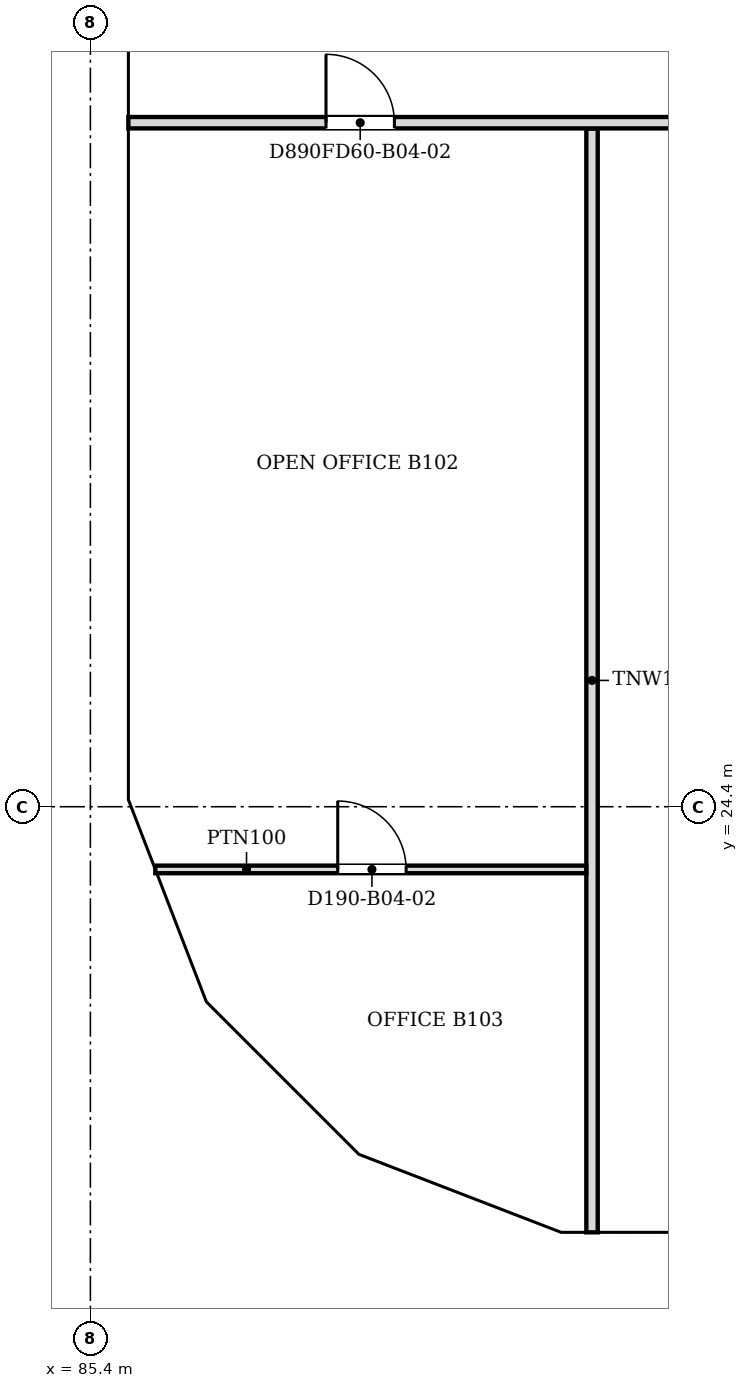
"""IFC4 building model, lengths in metres.
Left out: names, types, materials, properties, quantities, classifications, styles, units other than length and angle.
Written with IfcOpenShell. Run it as: python <this file> out.ifc"""

import sys

from ifc_helpers import new_model, si_unit, direction, frame, frame_2d, origin, place, context, subcontext, project, spatial, polyline, rectangle, outline, extrude, faceted_brep, source, transform, mapped, element, fill, save


model = new_model("IFC4")
c1 = context("Model", 3, precision=1e-05, world=origin(), true_north=direction((0.0, 1.0)))
c2 = subcontext(c1, "Body", "Model", "MODEL_VIEW")
j1 = project(units=[si_unit("LENGTHUNIT", "METRE"), si_unit("PLANEANGLEUNIT", "RADIAN")], contexts=[c1])
p1 = place(None, origin())
s1 = spatial("IfcSite", under=j1, at=p1, CompositionType="ELEMENT")
p2 = place(p1, origin())
s2 = spatial("IfcBuilding", under=s1, at=p2, CompositionType="ELEMENT")
p3 = place(p2, frame((0.0, 0.0, 41.0)))
s3 = spatial("IfcBuildingStorey", under=s2, at=p3, CompositionType="ELEMENT", Elevation=41.0)
m1 = source(origin(), c2, "Body", "Brep", [
    faceted_brep([(0.047, -0.25, 0.0), (3.05, -0.25, 3.8), (0.047, -0.25, 7.6), (0.0, -0.25, 7.54), (0.0, -0.25, 0.06), (0.093, 0.25, 7.541), (3.05, 0.25, 3.8), (0.093, 0.25, 0.059), (0.047, 0.0, 0.0), (0.047, 0.0, 7.6)], [[[0, 1, 2, 3, 4]], [[5, 6, 7]], [[7, 6, 1, 0, 8]], [[6, 5, 9, 2, 1]], [[3, 2, 9]], [[8, 0, 4]], [[7, 8, 4, 3, 9, 5]]]),
])
p4 = place(p3, frame((91.5, 18.55, -3.8), z_axis=(0.0, 0.0, 1.0), x_axis=(1.0, 0.0, 0.0)))
e1 = element("IfcWall", 1, at=p4, inside=s3, PredefinedType="SOLIDWALL", context=c2, shape_type="MappedRepresentation", body=[
    mapped(m1, transform((0.0, 0.0, 0.0), scale=1.0)),
])
m2 = source(origin(), c2, "Body", "SweptSolid", [
    extrude(outline(polyline([(0.247, 0.656), (2.731, 3.8), (0.247, 6.944), (0.247, 0.656)])), frame((0.0, 0.26, 0.0), z_axis=(0.0, -1.0, 0.0), x_axis=(1.0, 0.0, 0.0)), (0.0, 0.0, 1.0), 0.52),
])
p5 = place(p4, origin())
e2 = element("IfcOpeningElement", 2, at=p5, cuts=e1, PredefinedType="OPENING", context=c2, shape_type="MappedRepresentation", body=[
    mapped(m2, transform((0.0, 0.0, 0.0), scale=1.0)),
])
m3 = source(origin(), c2, "Body", "Brep", [
    faceted_brep([(2.95, -0.25, 0.0), (2.997, -0.25, 0.059), (2.997, -0.25, 7.541), (2.95, -0.25, 7.6), (0.0, -0.25, 3.8), (0.053, 0.25, 3.868), (2.904, 0.25, 7.54), (2.904, 0.25, 0.06), (0.053, 0.25, 3.732), (2.95, 0.0, 0.0), (2.95, 0.0, 7.6), (0.0, 0.0, 3.8)], [[[0, 1, 2, 3, 4]], [[5, 6, 7, 8]], [[1, 0, 9]], [[10, 3, 2]], [[6, 5, 11, 4, 3, 10]], [[8, 7, 9, 0, 4, 11]], [[8, 11, 5]], [[1, 9, 7, 6, 10, 2]]]),
])
p6 = place(p3, frame((88.794, 19.612, -3.8), z_axis=(0.0, 0.0, 1.0), x_axis=(0.933000876937, -0.359874094142, 0.0)))
e3 = element("IfcWall", 3, at=p6, inside=s3, PredefinedType="SOLIDWALL", context=c2, shape_type="MappedRepresentation", body=[
    mapped(m3, transform((0.0, 0.0, 0.0), scale=1.0)),
])
m4 = source(origin(), c2, "Body", "SweptSolid", [
    extrude(outline(polyline([(2.75, 6.935), (0.316, 3.8), (2.75, 0.665), (2.75, 6.935)])), frame((0.0, 0.26, 0.0), z_axis=(0.0, -1.0, 0.0), x_axis=(1.0, 0.0, 0.0)), (0.0, 0.0, 1.0), 0.52),
])
p7 = place(p6, origin())
e4 = element("IfcOpeningElement", 4, at=p7, cuts=e3, PredefinedType="OPENING", context=c2, shape_type="MappedRepresentation", body=[
    mapped(m4, transform((0.0, 0.0, 0.0), scale=1.0)),
])
m5 = source(origin(), c2, "Body", "SweptSolid", [
    extrude(outline(polyline([(3.05, 0.0), (6.1, 3.8), (3.05, 7.6), (0.0, 3.8), (3.05, 0.0)])), frame((0.0, 0.25, 0.0), z_axis=(0.0, -1.0, 0.0), x_axis=(1.0, 0.0, 0.0)), (0.0, 0.0, 1.0), 0.5),
])
p8 = place(p3, frame((85.65, 36.6, -3.8), z_axis=(0.0, 0.0, 1.0), x_axis=(0.0, -1.0, 0.0)))
e5 = element("IfcWall", 5, at=p8, inside=s3, PredefinedType="SOLIDWALL", context=c2, shape_type="MappedRepresentation", body=[
    mapped(m5, transform((0.0, 0.0, 0.0), scale=1.0)),
])
m6 = source(origin(), c2, "Body", "SweptSolid", [
    extrude(outline(polyline([(3.05, 0.399), (5.78, 3.8), (3.05, 7.201), (0.321, 3.8), (3.05, 0.399)])), frame((0.0, 0.26, 0.0), z_axis=(0.0, -1.0, 0.0), x_axis=(1.0, 0.0, 0.0)), (0.0, 0.0, 1.0), 0.52),
])
p9 = place(p8, origin())
e6 = element("IfcOpeningElement", 6, at=p9, cuts=e5, PredefinedType="OPENING", context=c2, shape_type="MappedRepresentation", body=[
    mapped(m6, transform((0.0, 0.0, 0.0), scale=1.0)),
])
m7 = source(origin(), c2, "Body", "Brep", [
    faceted_brep([(3.05, -0.25, 0.0), (6.053, -0.25, 3.8), (3.05, -0.25, 7.6), (0.0, -0.25, 3.8), (0.0, 0.25, 3.8), (3.05, 0.25, 7.6), (6.007, 0.25, 3.859), (6.007, 0.25, 3.741), (3.05, 0.25, 0.0), (6.053, 0.0, 3.8)], [[[0, 1, 2, 3]], [[4, 5, 6, 7, 8]], [[8, 7, 9, 1, 0]], [[6, 5, 2, 1, 9]], [[5, 4, 3, 2]], [[4, 8, 0, 3]], [[9, 7, 6]]]),
])
p10 = place(p3, frame((85.65, 30.5, -3.8), z_axis=(0.0, 0.0, 1.0), x_axis=(0.0, -1.0, 0.0)))
e7 = element("IfcWall", 7, at=p10, inside=s3, PredefinedType="SOLIDWALL", context=c2, shape_type="MappedRepresentation", body=[
    mapped(m7, transform((0.0, 0.0, 0.0), scale=1.0)),
])
m8 = source(origin(), c2, "Body", "SweptSolid", [
    extrude(outline(polyline([(3.049, 0.401), (5.735, 3.8), (3.049, 7.199), (0.321, 3.8), (3.049, 0.401)])), frame((0.0, 0.26, 0.0), z_axis=(0.0, -1.0, 0.0), x_axis=(1.0, 0.0, 0.0)), (0.0, 0.0, 1.0), 0.52),
])
p11 = place(p10, origin())
e8 = element("IfcOpeningElement", 8, at=p11, cuts=e7, PredefinedType="OPENING", context=c2, shape_type="MappedRepresentation", body=[
    mapped(m8, transform((0.0, 0.0, 0.0), scale=1.0)),
])
m9 = source(origin(), c2, "Body", "Brep", [
    faceted_brep([(2.95, -0.25, 0.0), (3.003, -0.25, 0.068), (3.003, -0.25, 7.532), (2.95, -0.25, 7.6), (0.0, -0.25, 3.8), (0.047, 0.25, 3.86), (2.898, 0.25, 7.532), (2.898, 0.25, 0.068), (0.047, 0.25, 3.74), (2.95, 0.0, 0.0), (2.95, 0.0, 7.6), (0.0, 0.0, 3.8)], [[[0, 1, 2, 3, 4]], [[5, 6, 7, 8]], [[1, 0, 9]], [[10, 3, 2]], [[6, 5, 11, 4, 3, 10]], [[8, 7, 9, 0, 4, 11]], [[8, 11, 5]], [[1, 9, 7, 6, 10, 2]]]),
])
p12 = place(p3, frame((85.65, 24.447, -3.8), z_axis=(0.0, 0.0, 1.0), x_axis=(0.35992665181, -0.932980602862, 0.0)))
e9 = element("IfcWall", 9, at=p12, inside=s3, PredefinedType="SOLIDWALL", context=c2, shape_type="MappedRepresentation", body=[
    mapped(m9, transform((0.0, 0.0, 0.0), scale=1.0)),
])
p13 = place(p12, origin())
e10 = element("IfcOpeningElement", 10, at=p13, cuts=e9, PredefinedType="OPENING", context=c2, shape_type="MappedRepresentation", body=[
    mapped(m4, transform((0.0, 0.0, 0.0), scale=1.0)),
])
m10 = source(origin(), c2, "Body", "Brep", [
    faceted_brep([(0.053, -0.25, 0.0), (2.997, -0.25, 3.8), (0.053, -0.25, 7.6), (0.0, -0.25, 7.532), (0.0, -0.25, 0.068), (0.106, 0.25, 7.532), (2.944, 0.25, 3.868), (2.944, 0.25, 3.732), (0.106, 0.25, 0.068), (2.997, 0.0, 3.8), (0.053, 0.0, 0.0), (0.053, 0.0, 7.6)], [[[0, 1, 2, 3, 4]], [[5, 6, 7, 8]], [[8, 7, 9, 1, 0, 10]], [[6, 5, 11, 2, 1, 9]], [[3, 2, 11]], [[10, 0, 4]], [[8, 10, 4, 3, 11, 5]], [[9, 7, 6]]]),
])
p14 = place(p3, frame((86.675, 21.731, -3.8), z_axis=(0.0, 0.0, 1.0), x_axis=(0.707106781187, -0.707106781187, 0.0)))
e11 = element("IfcWall", 11, at=p14, inside=s3, PredefinedType="SOLIDWALL", context=c2, shape_type="MappedRepresentation", body=[
    mapped(m10, transform((0.0, 0.0, 0.0), scale=1.0)),
])
m11 = source(origin(), c2, "Body", "SweptSolid", [
    extrude(outline(polyline([(0.253, 0.666), (2.681, 3.8), (0.253, 6.934), (0.253, 0.666)])), frame((0.0, 0.26, 0.0), z_axis=(0.0, -1.0, 0.0), x_axis=(1.0, 0.0, 0.0)), (0.0, 0.0, 1.0), 0.52),
])
p15 = place(p14, origin())
e12 = element("IfcOpeningElement", 12, at=p15, cuts=e11, PredefinedType="OPENING", context=c2, shape_type="MappedRepresentation", body=[
    mapped(m11, transform((0.0, 0.0, 0.0), scale=1.0)),
])
p16 = place(p2, frame((0.0, 0.0, 44.8)))
s4 = spatial("IfcBuildingStorey", under=s2, at=p16, CompositionType="ELEMENT", Elevation=44.8)
m12 = source(origin(), c2, "Body", "Brep", [
    faceted_brep([(3.003, -0.25, 0.0), (6.053, -0.25, 3.8), (3.003, -0.25, 7.6), (0.0, -0.25, 3.8), (0.047, 0.25, 3.859), (3.003, 0.25, 7.6), (6.053, 0.25, 3.8), (3.003, 0.25, 0.0), (0.047, 0.25, 3.741), (0.0, 0.0, 3.8)], [[[0, 1, 2, 3]], [[4, 5, 6, 7, 8]], [[7, 6, 1, 0]], [[6, 5, 2, 1]], [[5, 4, 9, 3, 2]], [[8, 7, 0, 3, 9]], [[8, 9, 4]]]),
])
p17 = place(p16, frame((91.547, 18.55, -3.8), z_axis=(0.0, 0.0, 1.0), x_axis=(1.0, 0.0, 0.0)))
e13 = element("IfcWall", 13, at=p17, inside=s4, PredefinedType="SOLIDWALL", context=c2, shape_type="MappedRepresentation", body=[
    mapped(m12, transform((0.0, 0.0, 0.0), scale=1.0)),
])
m13 = source(origin(), c2, "Body", "SweptSolid", [
    extrude(outline(polyline([(3.005, 0.401), (5.733, 3.8), (3.005, 7.199), (0.319, 3.8), (3.005, 0.401)])), frame((0.0, 0.26, 0.0), z_axis=(0.0, -1.0, 0.0), x_axis=(1.0, 0.0, 0.0)), (0.0, 0.0, 1.0), 0.52),
])
p18 = place(p17, origin())
e14 = element("IfcOpeningElement", 14, at=p18, cuts=e13, PredefinedType="OPENING", context=c2, shape_type="MappedRepresentation", body=[
    mapped(m13, transform((0.0, 0.0, 0.0), scale=1.0)),
])
m14 = source(origin(), c2, "Body", "Brep", [
    faceted_brep([(3.05, -0.25, 0.0), (6.1, -0.25, 3.8), (6.1, -0.25, 3.8), (3.05, -0.25, 7.6), (0.0, -0.25, 3.8), (0.0, 0.25, 3.8), (3.05, 0.25, 7.6), (6.1, 0.25, 3.8), (6.1, 0.25, 3.8), (3.05, 0.25, 0.0)], [[[0, 1, 2, 3, 4]], [[5, 6, 7, 8, 9]], [[9, 8, 1, 0]], [[7, 6, 3, 2]], [[6, 5, 4, 3]], [[5, 9, 0, 4]], [[1, 8, 7, 2]]]),
])
p19 = place(p16, frame((85.65, 39.65, -3.8), z_axis=(0.0, 0.0, 1.0), x_axis=(0.0, -1.0, 0.0)))
e15 = element("IfcWall", 15, at=p19, inside=s4, PredefinedType="SOLIDWALL", context=c2, shape_type="MappedRepresentation", body=[
    mapped(m14, transform((0.0, 0.0, 0.0), scale=1.0)),
])
p20 = place(p19, origin())
e16 = element("IfcOpeningElement", 16, at=p20, cuts=e15, PredefinedType="OPENING", context=c2, shape_type="MappedRepresentation", body=[
    mapped(m6, transform((0.0, 0.0, 0.0), scale=1.0)),
])
p21 = place(p16, frame((85.65, 33.55, -3.8), z_axis=(0.0, 0.0, 1.0), x_axis=(0.0, -1.0, 0.0)))
e17 = element("IfcWall", 17, at=p21, inside=s4, PredefinedType="SOLIDWALL", context=c2, shape_type="MappedRepresentation", body=[
    mapped(m5, transform((0.0, 0.0, 0.0), scale=1.0)),
])
p22 = place(p21, origin())
e18 = element("IfcOpeningElement", 18, at=p22, cuts=e17, PredefinedType="OPENING", context=c2, shape_type="MappedRepresentation", body=[
    mapped(m6, transform((0.0, 0.0, 0.0), scale=1.0)),
])
m15 = source(origin(), c2, "Body", "Brep", [
    faceted_brep([(3.003, -0.25, 0.0), (3.05, -0.25, 0.06), (3.05, -0.25, 7.54), (3.003, -0.25, 7.6), (0.0, -0.25, 3.8), (0.0, 0.25, 3.8), (2.957, 0.25, 7.541), (2.957, 0.25, 0.059), (3.003, 0.0, 0.0), (3.003, 0.0, 7.6)], [[[0, 1, 2, 3, 4]], [[5, 6, 7]], [[1, 0, 8]], [[9, 3, 2]], [[6, 5, 4, 3, 9]], [[5, 7, 8, 0, 4]], [[1, 8, 7, 6, 9, 2]]]),
])
p23 = place(p16, frame((85.65, 27.45, -3.8), z_axis=(0.0, 0.0, 1.0), x_axis=(0.0, -1.0, 0.0)))
e19 = element("IfcWall", 19, at=p23, inside=s4, PredefinedType="SOLIDWALL", context=c2, shape_type="MappedRepresentation", body=[
    mapped(m15, transform((0.0, 0.0, 0.0), scale=1.0)),
])
m16 = source(origin(), c2, "Body", "SweptSolid", [
    extrude(outline(polyline([(2.803, 6.944), (0.319, 3.8), (2.803, 0.656), (2.803, 6.944)])), frame((0.0, 0.26, 0.0), z_axis=(0.0, -1.0, 0.0), x_axis=(1.0, 0.0, 0.0)), (0.0, 0.0, 1.0), 0.52),
])
p24 = place(p23, origin())
e20 = element("IfcOpeningElement", 20, at=p24, cuts=e19, PredefinedType="OPENING", context=c2, shape_type="MappedRepresentation", body=[
    mapped(m16, transform((0.0, 0.0, 0.0), scale=1.0)),
])
m17 = source(origin(), c2, "Body", "Brep", [
    faceted_brep([(0.047, -0.25, 0.0), (2.997, -0.25, 3.8), (0.047, -0.25, 7.6), (0.0, -0.25, 7.541), (0.0, -0.25, 0.059), (0.093, 0.25, 7.54), (2.944, 0.25, 3.868), (2.944, 0.25, 3.732), (0.093, 0.25, 0.06), (2.997, 0.0, 3.8), (0.047, 0.0, 0.0), (0.047, 0.0, 7.6)], [[[0, 1, 2, 3, 4]], [[5, 6, 7, 8]], [[8, 7, 9, 1, 0, 10]], [[6, 5, 11, 2, 1, 9]], [[3, 2, 11]], [[10, 0, 4]], [[8, 10, 4, 3, 11, 5]], [[9, 7, 6]]]),
])
p25 = place(p16, frame((85.633, 24.49, -3.8), z_axis=(0.0, 0.0, 1.0), x_axis=(0.359901446078, -0.932990326376, 0.0)))
e21 = element("IfcWall", 21, at=p25, inside=s4, PredefinedType="SOLIDWALL", context=c2, shape_type="MappedRepresentation", body=[
    mapped(m17, transform((0.0, 0.0, 0.0), scale=1.0)),
])
m18 = source(origin(), c2, "Body", "SweptSolid", [
    extrude(outline(polyline([(0.247, 0.665), (2.681, 3.8), (0.247, 6.935), (0.247, 0.665)])), frame((0.0, 0.26, 0.0), z_axis=(0.0, -1.0, 0.0), x_axis=(1.0, 0.0, 0.0)), (0.0, 0.0, 1.0), 0.52),
])
p26 = place(p25, origin())
e22 = element("IfcOpeningElement", 22, at=p26, cuts=e21, PredefinedType="OPENING", context=c2, shape_type="MappedRepresentation", body=[
    mapped(m18, transform((0.0, 0.0, 0.0), scale=1.0)),
])
m19 = source(origin(), c2, "Body", "Brep", [
    faceted_brep([(2.944, -0.25, 0.0), (2.997, -0.25, 0.068), (2.997, -0.25, 7.532), (2.944, -0.25, 7.6), (0.0, -0.25, 3.8), (0.053, 0.25, 3.868), (2.891, 0.25, 7.532), (2.891, 0.25, 0.068), (0.053, 0.25, 3.732), (2.944, 0.0, 0.0), (2.944, 0.0, 7.6), (0.0, 0.0, 3.8)], [[[0, 1, 2, 3, 4]], [[5, 6, 7, 8]], [[1, 0, 9]], [[10, 3, 2]], [[6, 5, 11, 4, 3, 10]], [[8, 7, 9, 0, 4, 11]], [[8, 11, 5]], [[1, 9, 7, 6, 10, 2]]]),
])
p27 = place(p16, frame((86.712, 21.694, -3.8), z_axis=(0.0, 0.0, 1.0), x_axis=(0.707066050402, -0.707147509625, 0.0)))
e23 = element("IfcWall", 23, at=p27, inside=s4, PredefinedType="SOLIDWALL", context=c2, shape_type="MappedRepresentation", body=[
    mapped(m19, transform((0.0, 0.0, 0.0), scale=1.0)),
])
m20 = source(origin(), c2, "Body", "SweptSolid", [
    extrude(outline(polyline([(2.744, 6.934), (0.316, 3.8), (2.744, 0.666), (2.744, 6.934)])), frame((0.0, 0.26, 0.0), z_axis=(0.0, -1.0, 0.0), x_axis=(1.0, 0.0, 0.0)), (0.0, 0.0, 1.0), 0.52),
])
p28 = place(p27, origin())
e24 = element("IfcOpeningElement", 24, at=p28, cuts=e23, PredefinedType="OPENING", context=c2, shape_type="MappedRepresentation", body=[
    mapped(m20, transform((0.0, 0.0, 0.0), scale=1.0)),
])
m21 = source(origin(), c2, "Body", "Brep", [
    faceted_brep([(0.053, -0.25, 0.0), (3.003, -0.25, 3.8), (0.053, -0.25, 7.6), (0.0, -0.25, 7.532), (0.0, -0.25, 0.068), (0.106, 0.25, 7.532), (2.957, 0.25, 3.86), (2.957, 0.25, 3.74), (0.106, 0.25, 0.068), (3.003, 0.0, 3.8), (0.053, 0.0, 0.0), (0.053, 0.0, 7.6)], [[[0, 1, 2, 3, 4]], [[5, 6, 7, 8]], [[8, 7, 9, 1, 0, 10]], [[6, 5, 11, 2, 1, 9]], [[3, 2, 11]], [[10, 0, 4]], [[8, 10, 4, 3, 11, 5]], [[9, 7, 6]]]),
])
p29 = place(p16, frame((88.744, 19.631, -3.8), z_axis=(0.0, 0.0, 1.0), x_axis=(0.932997369089, -0.359883188373, 0.0)))
e25 = element("IfcWall", 25, at=p29, inside=s4, PredefinedType="SOLIDWALL", context=c2, shape_type="MappedRepresentation", body=[
    mapped(m21, transform((0.0, 0.0, 0.0), scale=1.0)),
])
m22 = source(origin(), c2, "Body", "SweptSolid", [
    extrude(outline(polyline([(0.253, 0.665), (2.687, 3.8), (0.253, 6.935), (0.253, 0.665)])), frame((0.0, 0.26, 0.0), z_axis=(0.0, -1.0, 0.0), x_axis=(1.0, 0.0, 0.0)), (0.0, 0.0, 1.0), 0.52),
])
p30 = place(p29, origin())
e26 = element("IfcOpeningElement", 26, at=p30, cuts=e25, PredefinedType="OPENING", context=c2, shape_type="MappedRepresentation", body=[
    mapped(m22, transform((0.0, 0.0, 0.0), scale=1.0)),
])
p31 = place(p3, frame((92.0, 18.8, 0.0), z_axis=(0.0, 0.0, 1.0), x_axis=(0.0, 1.0, 0.0)))
e27 = element("IfcWall", 27, at=p31, inside=s3, PredefinedType="PARTITIONING", context=c2, shape_type="SweptSolid", body=[
    extrude(rectangle(XDim=14.524, YDim=0.15, at=frame_2d((7.262, 0.0))), origin(), (0.0, 0.0, 1.0), 3.067),
])
p32 = place(p3, frame((91.924, 23.575, 0.0), z_axis=(0.0, 0.0, 1.0), x_axis=(-1.0, 0.0, 0.0)))
e28 = element("IfcWall", 28, at=p32, inside=s3, PredefinedType="PARTITIONING", context=c2, shape_type="SweptSolid", body=[
    extrude(rectangle(XDim=5.67, YDim=0.1, at=frame_2d((2.835, 0.0))), origin(), (0.0, 0.0, 1.0), 3.067),
])
m23 = source(origin(), c2, "Body", "SweptSolid", [
    extrude(rectangle(XDim=0.9, YDim=2.1, at=frame_2d((0.45, 1.05))), frame((0.0, 0.06, 0.0), z_axis=(0.0, -1.0, 0.0), x_axis=(1.0, 0.0, 0.0)), (0.0, 0.0, 1.0), 0.12),
])
p33 = place(p32, frame((2.37, 0.0, 0.0)))
e29 = element("IfcOpeningElement", 29, at=p33, cuts=e28, PredefinedType="OPENING", context=c2, shape_type="MappedRepresentation", body=[
    mapped(m23, transform((0.0, 0.0, 0.0), scale=1.0)),
])
p34 = place(p3, frame((133.7, 33.4, 0.0), z_axis=(0.0, 0.0, 1.0), x_axis=(-1.0, 0.0, 0.0)))
e30 = element("IfcWall", 30, at=p34, inside=s3, PredefinedType="PARTITIONING", context=c2, shape_type="SweptSolid", body=[
    extrude(rectangle(XDim=47.8, YDim=0.15, at=frame_2d((23.9, 0.0))), origin(), (0.0, 0.0, 1.0), 3.067),
])
m24 = source(origin(), c2, "Body", "SweptSolid", [
    extrude(rectangle(XDim=0.9, YDim=2.1, at=frame_2d((0.45, 1.05))), frame((0.0, 0.085, 0.0), z_axis=(0.0, -1.0, 0.0), x_axis=(1.0, 0.0, 0.0)), (0.0, 0.0, 1.0), 0.17),
])
p35 = place(p34, frame((14.099, 0.0, 0.0)))
e31 = element("IfcOpeningElement", 31, at=p35, cuts=e30, PredefinedType="OPENING", context=c2, shape_type="MappedRepresentation", body=[
    mapped(m24, transform((0.0, 0.0, 0.0), scale=1.0)),
])
p36 = place(p34, frame((44.3, 0.0, 0.0)))
e32 = element("IfcOpeningElement", 32, at=p36, cuts=e30, PredefinedType="OPENING", context=c2, shape_type="MappedRepresentation", body=[
    mapped(m24, transform((0.0, 0.0, 0.0), scale=1.0)),
])
p37 = place(p34, frame((5.4, 0.0, 0.0)))
e33 = element("IfcOpeningElement", 33, at=p37, cuts=e30, PredefinedType="OPENING", context=c2, shape_type="MappedRepresentation", body=[
    mapped(m24, transform((0.0, 0.0, 0.0), scale=1.0)),
])
m25 = source(origin(), c2, "Body", "SweptSolid", [
    extrude(rectangle(XDim=1.0, YDim=2.1, at=frame_2d((0.5, 1.05))), frame((0.0, 0.085, 0.0), z_axis=(0.0, -1.0, 0.0), x_axis=(1.0, 0.0, 0.0)), (0.0, 0.0, 1.0), 0.17),
])
p38 = place(p34, frame((22.899, 0.0, 0.0)))
e34 = element("IfcOpeningElement", 34, at=p38, cuts=e30, PredefinedType="OPENING", context=c2, shape_type="MappedRepresentation", body=[
    mapped(m25, transform((0.0, 0.0, 0.0), scale=1.0)),
])
p39 = place(p34, frame((35.1, 0.0, 0.0)))
e35 = element("IfcOpeningElement", 35, at=p39, cuts=e30, PredefinedType="OPENING", context=c2, shape_type="MappedRepresentation", body=[
    mapped(m25, transform((0.0, 0.0, 0.0), scale=1.0)),
])
m26 = source(origin(), c2, "Body", "SweptSolid", [
    extrude(rectangle(XDim=0.9, YDim=2.1, at=frame_2d((0.45, 1.05))), frame((0.0, 0.025, 0.0), z_axis=(0.0, -1.0, 0.0), x_axis=(1.0, 0.0, 0.0)), (0.0, 0.0, 1.0), 0.05),
])
p40 = place(p33, origin())
e36 = element("IfcDoor", 36, at=p40, inside=s3, OperationType="SINGLE_SWING_RIGHT", PredefinedType="DOOR", context=c2, shape_type="MappedRepresentation", body=[
    mapped(m26, transform((0.0, 0.0, 0.0), scale=1.0)),
])
fill(e29, e36)
p41 = place(p36, origin())
e37 = element("IfcDoor", 37, at=p41, inside=s3, OperationType="SINGLE_SWING_RIGHT", PredefinedType="DOOR", context=c2, shape_type="MappedRepresentation", body=[
    mapped(m26, transform((0.0, 0.0, 0.0), scale=1.0)),
])
fill(e32, e37)
save(model, sys.argv[1])
